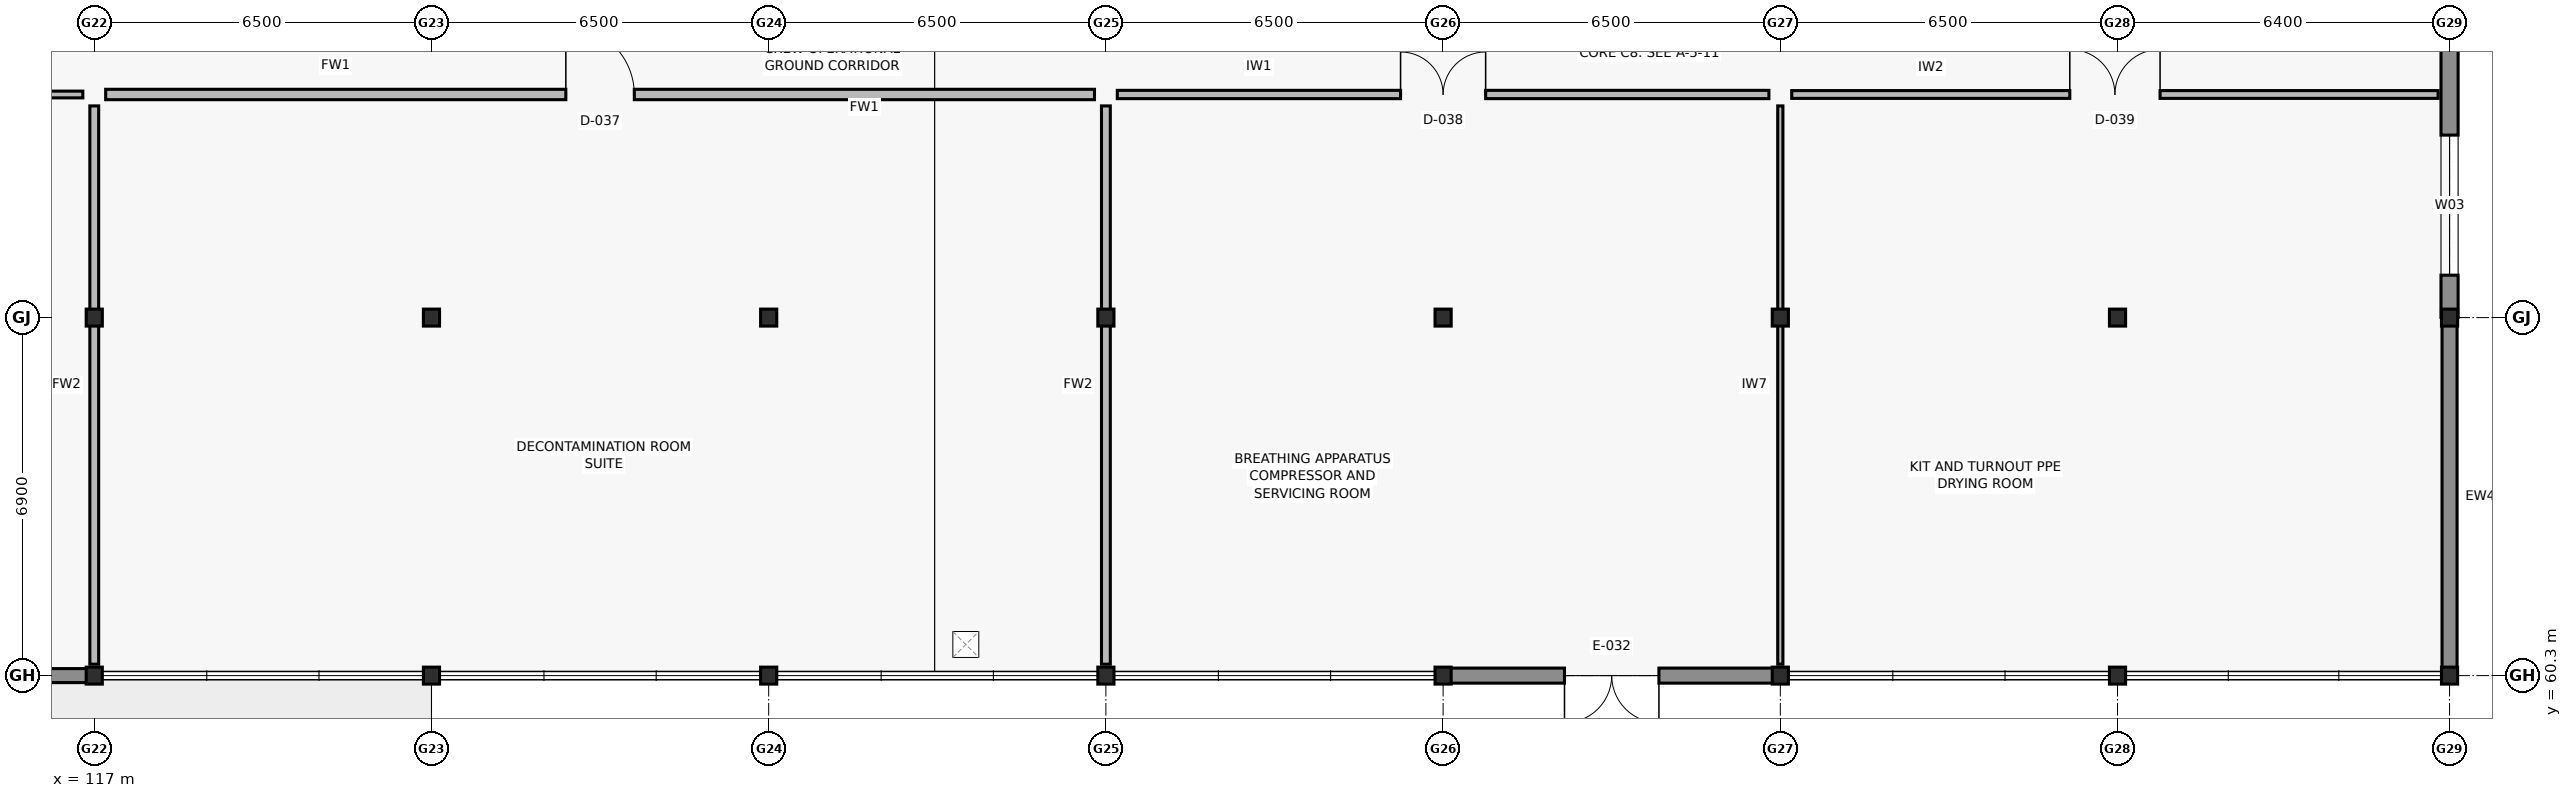
"""IFC4 building model, lengths in metres.
Left out: names, types, materials, properties, quantities, classifications, styles, units other than length and angle.
Written with IfcOpenShell. Run it as: python <this file> out.ifc"""

import sys

from ifc_helpers import new_model, si_unit, direction, frame, frame_2d, origin, origin_2d, place, context, subcontext, project, spatial, rectangle, i_section, extrude, element, fill, save


model = new_model("IFC4")
c1 = context("Model", 3, precision=1e-05, world=origin(), true_north=direction((0.0, 1.0)))
c2 = subcontext(c1, "Body", "Model", "MODEL_VIEW")
j1 = project(units=[si_unit("LENGTHUNIT", "METRE"), si_unit("PLANEANGLEUNIT", "RADIAN")], contexts=[c1])
p1 = place(None, origin())
s1 = spatial("IfcSite", under=j1, at=p1, CompositionType="ELEMENT")
p2 = place(p1, origin())
s2 = spatial("IfcBuilding", under=s1, at=p2, CompositionType="ELEMENT")
p3 = place(p2, origin())
s3 = spatial("IfcBuildingStorey", under=s2, at=p3, CompositionType="ELEMENT", Elevation=0.0)
for number, where, z_axis, x_axis in (
    (1, (117.0, 60.3, 0.0), (0.0, 0.0, 1.0), (1.0, 0.0, 0.0)),
    (2, (117.0, 67.2, 0.0), (0.0, 0.0, 1.0), (1.0, 0.0, 0.0)),
    (3, (123.5, 60.3, 0.0), (0.0, 0.0, 1.0), (1.0, 0.0, 0.0)),
    (4, (123.5, 67.2, 0.0), (0.0, 0.0, 1.0), (1.0, 0.0, 0.0)),
    (5, (130.0, 60.3, 0.0), (0.0, 0.0, 1.0), (1.0, 0.0, 0.0)),
    (6, (130.0, 67.2, 0.0), (0.0, 0.0, 1.0), (1.0, 0.0, 0.0)),
    (7, (136.5, 60.3, 0.0), (0.0, 0.0, 1.0), (1.0, 0.0, 0.0)),
    (8, (136.5, 67.2, 0.0), (0.0, 0.0, 1.0), (1.0, 0.0, 0.0)),
    (9, (143.0, 60.3, 0.0), (0.0, 0.0, 1.0), (1.0, 0.0, 0.0)),
    (10, (143.0, 67.2, 0.0), (0.0, 0.0, 1.0), (1.0, 0.0, 0.0)),
    (11, (149.5, 60.3, 0.0), (0.0, 0.0, 1.0), (1.0, 0.0, 0.0)),
    (12, (149.5, 67.2, 0.0), (0.0, 0.0, 1.0), (1.0, 0.0, 0.0)),
    (13, (156.0, 60.3, 0.0), (0.0, 0.0, 1.0), (1.0, 0.0, 0.0)),
    (14, (156.0, 67.2, 0.0), (0.0, 0.0, 1.0), (1.0, 0.0, 0.0)),
    (15, (162.4, 60.3, 0.0), (0.0, 0.0, 1.0), (1.0, 0.0, 0.0)),
    (16, (162.4, 67.2, 0.0), (0.0, 0.0, 1.0), (1.0, 0.0, 0.0)),
):
    element("IfcColumn", number, at=place(p3, frame(where, z_axis=z_axis, x_axis=x_axis)), inside=s3, PredefinedType="COLUMN", context=c2, shape_type="SweptSolid", body=[
        extrude(i_section(OverallWidth=0.311, OverallDepth=0.327, WebThickness=0.016, FlangeThickness=0.025, FilletRadius=0.017, at=origin_2d()), origin(), (0.0, 0.0, 1.0), 5.4),
    ])
p4 = place(p3, frame((116.995, 60.3, 0.0), z_axis=(0.0, 0.0, 1.0), x_axis=(-1.0, 0.0, 0.0)))
e17 = element("IfcWall", 17, at=p4, inside=s3, PredefinedType="SOLIDWALL", context=c2, shape_type="SweptSolid", body=[
    extrude(rectangle(XDim=6.49, YDim=0.27, at=frame_2d((3.245, 0.0))), origin(), (0.0, 0.0, 1.0), 4.52),
])
p5 = place(p4, frame((2.335, 0.0, 0.0)))
e18 = element("IfcOpeningElement", 18, at=p5, cuts=e17, PredefinedType="OPENING", context=c2, shape_type="SweptSolid", body=[
    extrude(rectangle(XDim=1.82, YDim=2.2, at=frame_2d((0.91, 1.1))), frame((0.0, 0.145, 0.0), z_axis=(0.0, -1.0, 0.0), x_axis=(1.0, 0.0, 0.0)), (0.0, 0.0, 1.0), 0.29),
])
p6 = place(p3, frame((149.495, 60.3, 0.0), z_axis=(0.0, 0.0, 1.0), x_axis=(-1.0, 0.0, 0.0)))
e19 = element("IfcWall", 19, at=p6, inside=s3, PredefinedType="SOLIDWALL", context=c2, shape_type="SweptSolid", body=[
    extrude(rectangle(XDim=6.49, YDim=0.29, at=frame_2d((3.245, 0.0))), origin(), (0.0, 0.0, 1.0), 4.52),
])
p7 = place(p6, frame((2.335, 0.0, 0.0)))
e20 = element("IfcOpeningElement", 20, at=p7, cuts=e19, PredefinedType="OPENING", context=c2, shape_type="SweptSolid", body=[
    extrude(rectangle(XDim=1.82, YDim=2.2, at=frame_2d((0.91, 1.1))), frame((0.0, 0.155, 0.0), z_axis=(0.0, -1.0, 0.0), x_axis=(1.0, 0.0, 0.0)), (0.0, 0.0, 1.0), 0.31),
])
p8 = place(p3, frame((162.4, 67.195, 0.0), z_axis=(0.0, 0.0, 1.0), x_axis=(0.0, -1.0, 0.0)))
e21 = element("IfcWall", 21, at=p8, inside=s3, PredefinedType="SOLIDWALL", context=c2, shape_type="SweptSolid", body=[
    extrude(rectangle(XDim=6.89, YDim=0.29, at=frame_2d((3.445, 0.0))), origin(), (0.0, 0.0, 1.0), 4.52),
])
p9 = place(p3, frame((162.4, 74.095, 0.0), z_axis=(0.0, 0.0, 1.0), x_axis=(0.0, -1.0, 0.0)))
e22 = element("IfcWall", 22, at=p9, inside=s3, PredefinedType="SOLIDWALL", context=c2, shape_type="SweptSolid", body=[
    extrude(rectangle(XDim=6.89, YDim=0.33, at=frame_2d((3.445, 0.0))), origin(), (0.0, 0.0, 1.0), 4.52),
])
p10 = place(p9, frame((3.377, 0.0, 0.8)))
e23 = element("IfcOpeningElement", 23, at=p10, cuts=e22, PredefinedType="OPENING", context=c2, shape_type="SweptSolid", body=[
    extrude(rectangle(XDim=2.7, YDim=2.1, at=frame_2d((1.35, 1.05))), frame((0.0, 0.175, 0.0), z_axis=(0.0, -1.0, 0.0), x_axis=(1.0, 0.0, 0.0)), (0.0, 0.0, 1.0), 0.35),
])
p11 = place(p3, frame((117.0, 60.52, 0.0), z_axis=(0.0, 0.0, 1.0), x_axis=(0.0, 1.0, 0.0)))
e24 = element("IfcWall", 24, at=p11, inside=s3, PredefinedType="PARTITIONING", context=c2, shape_type="SweptSolid", body=[
    extrude(rectangle(XDim=10.76, YDim=0.17, at=frame_2d((5.38, 0.0))), origin(), (0.0, 0.0, 1.0), 4.5),
])
p12 = place(p3, frame((104.22, 71.5, 0.0), z_axis=(0.0, 0.0, 1.0), x_axis=(1.0, 0.0, 0.0)))
e25 = element("IfcWall", 25, at=p12, inside=s3, PredefinedType="PARTITIONING", context=c2, shape_type="SweptSolid", body=[
    extrude(rectangle(XDim=12.56, YDim=0.13, at=frame_2d((6.28, 0.0))), origin(), (0.0, 0.0, 1.0), 4.5),
])
p13 = place(p12, frame((5.54, 0.0, 0.0)))
e26 = element("IfcOpeningElement", 26, at=p13, cuts=e25, PredefinedType="OPENING", context=c2, shape_type="SweptSolid", body=[
    extrude(rectangle(XDim=1.48, YDim=2.18, at=frame_2d((0.74, 1.09))), frame((0.0, 0.075, 0.0), z_axis=(0.0, -1.0, 0.0), x_axis=(1.0, 0.0, 0.0)), (0.0, 0.0, 1.0), 0.15),
])
p14 = place(p3, frame((136.5, 60.52, 0.0), z_axis=(0.0, 0.0, 1.0), x_axis=(0.0, 1.0, 0.0)))
e27 = element("IfcWall", 27, at=p14, inside=s3, PredefinedType="PARTITIONING", context=c2, shape_type="SweptSolid", body=[
    extrude(rectangle(XDim=10.76, YDim=0.17, at=frame_2d((5.38, 0.0))), origin(), (0.0, 0.0, 1.0), 4.5),
])
p15 = place(p3, frame((117.22, 71.5, 0.0), z_axis=(0.0, 0.0, 1.0), x_axis=(1.0, 0.0, 0.0)))
e28 = element("IfcWall", 28, at=p15, inside=s3, PredefinedType="PARTITIONING", context=c2, shape_type="SweptSolid", body=[
    extrude(rectangle(XDim=19.06, YDim=0.2, at=frame_2d((9.53, 0.0))), origin(), (0.0, 0.0, 1.0), 4.5),
])
p16 = place(p15, frame((8.87, 0.0, 0.0)))
e29 = element("IfcOpeningElement", 29, at=p16, cuts=e28, PredefinedType="OPENING", context=c2, shape_type="SweptSolid", body=[
    extrude(rectangle(XDim=1.32, YDim=2.12, at=frame_2d((0.66, 1.06))), frame((0.0, 0.11, 0.0), z_axis=(0.0, -1.0, 0.0), x_axis=(1.0, 0.0, 0.0)), (0.0, 0.0, 1.0), 0.22),
])
p17 = place(p3, frame((149.5, 60.52, 0.0), z_axis=(0.0, 0.0, 1.0), x_axis=(0.0, 1.0, 0.0)))
e30 = element("IfcWall", 30, at=p17, inside=s3, PredefinedType="PARTITIONING", context=c2, shape_type="SweptSolid", body=[
    extrude(rectangle(XDim=10.76, YDim=0.1, at=frame_2d((5.38, 0.0))), origin(), (0.0, 0.0, 1.0), 4.5),
])
p18 = place(p3, frame((136.72, 71.5, 0.0), z_axis=(0.0, 0.0, 1.0), x_axis=(1.0, 0.0, 0.0)))
e31 = element("IfcWall", 31, at=p18, inside=s3, PredefinedType="PARTITIONING", context=c2, shape_type="SweptSolid", body=[
    extrude(rectangle(XDim=12.56, YDim=0.16, at=frame_2d((6.28, 0.0))), origin(), (0.0, 0.0, 1.0), 4.5),
])
p19 = place(p18, frame((5.46, 0.0, 0.0)))
e32 = element("IfcOpeningElement", 32, at=p19, cuts=e31, PredefinedType="OPENING", context=c2, shape_type="SweptSolid", body=[
    extrude(rectangle(XDim=1.64, YDim=2.2, at=frame_2d((0.82, 1.1))), frame((0.0, 0.09, 0.0), z_axis=(0.0, -1.0, 0.0), x_axis=(1.0, 0.0, 0.0)), (0.0, 0.0, 1.0), 0.18),
])
p20 = place(p3, frame((149.72, 71.5, 0.0), z_axis=(0.0, 0.0, 1.0), x_axis=(1.0, 0.0, 0.0)))
e33 = element("IfcWall", 33, at=p20, inside=s3, PredefinedType="PARTITIONING", context=c2, shape_type="SweptSolid", body=[
    extrude(rectangle(XDim=12.46, YDim=0.15, at=frame_2d((6.23, 0.0))), origin(), (0.0, 0.0, 1.0), 4.5),
])
p21 = place(p20, frame((5.36, 0.0, 0.0)))
e34 = element("IfcOpeningElement", 34, at=p21, cuts=e33, PredefinedType="OPENING", context=c2, shape_type="SweptSolid", body=[
    extrude(rectangle(XDim=1.74, YDim=2.2, at=frame_2d((0.87, 1.1))), frame((0.0, 0.085, 0.0), z_axis=(0.0, -1.0, 0.0), x_axis=(1.0, 0.0, 0.0)), (0.0, 0.0, 1.0), 0.17),
])
p22 = place(p7, origin())
e35 = element("IfcDoor", 35, at=p22, inside=s3, OperationType="DOUBLE_DOOR_SINGLE_SWING", PredefinedType="DOOR", context=c2, shape_type="SweptSolid", body=[
    extrude(rectangle(XDim=1.82, YDim=2.2, at=frame_2d((0.91, 1.1))), frame((0.0, 0.025, 0.0), z_axis=(0.0, -1.0, 0.0), x_axis=(1.0, 0.0, 0.0)), (0.0, 0.0, 1.0), 0.05),
])
fill(e20, e35)
p23 = place(p10, origin())
e36 = element("IfcWindow", 36, at=p23, inside=s3, PartitioningType="TRIPLE_PANEL_VERTICAL", PredefinedType="WINDOW", context=c2, shape_type="SweptSolid", body=[
    extrude(rectangle(XDim=2.7, YDim=2.1, at=frame_2d((1.35, 1.05))), frame((0.0, 0.03, 0.0), z_axis=(0.0, -1.0, 0.0), x_axis=(1.0, 0.0, 0.0)), (0.0, 0.0, 1.0), 0.06),
])
fill(e23, e36)
p24 = place(p16, origin())
e37 = element("IfcDoor", 37, at=p24, inside=s3, OperationType="SINGLE_SWING_LEFT", PredefinedType="DOOR", context=c2, shape_type="SweptSolid", body=[
    extrude(rectangle(XDim=1.32, YDim=2.12, at=frame_2d((0.66, 1.06))), frame((0.0, 0.025, 0.0), z_axis=(0.0, -1.0, 0.0), x_axis=(1.0, 0.0, 0.0)), (0.0, 0.0, 1.0), 0.05),
])
fill(e29, e37)
p25 = place(p19, origin())
e38 = element("IfcDoor", 38, at=p25, inside=s3, OperationType="DOUBLE_DOOR_SINGLE_SWING", PredefinedType="DOOR", context=c2, shape_type="SweptSolid", body=[
    extrude(rectangle(XDim=1.64, YDim=2.2, at=frame_2d((0.82, 1.1))), frame((0.0, 0.025, 0.0), z_axis=(0.0, -1.0, 0.0), x_axis=(1.0, 0.0, 0.0)), (0.0, 0.0, 1.0), 0.05),
])
fill(e32, e38)
p26 = place(p21, origin())
e39 = element("IfcDoor", 39, at=p26, inside=s3, OperationType="DOUBLE_DOOR_SINGLE_SWING", PredefinedType="DOOR", context=c2, shape_type="SweptSolid", body=[
    extrude(rectangle(XDim=1.74, YDim=2.2, at=frame_2d((0.87, 1.1))), frame((0.0, 0.025, 0.0), z_axis=(0.0, -1.0, 0.0), x_axis=(1.0, 0.0, 0.0)), (0.0, 0.0, 1.0), 0.05),
])
fill(e34, e39)
save(model, sys.argv[1])
